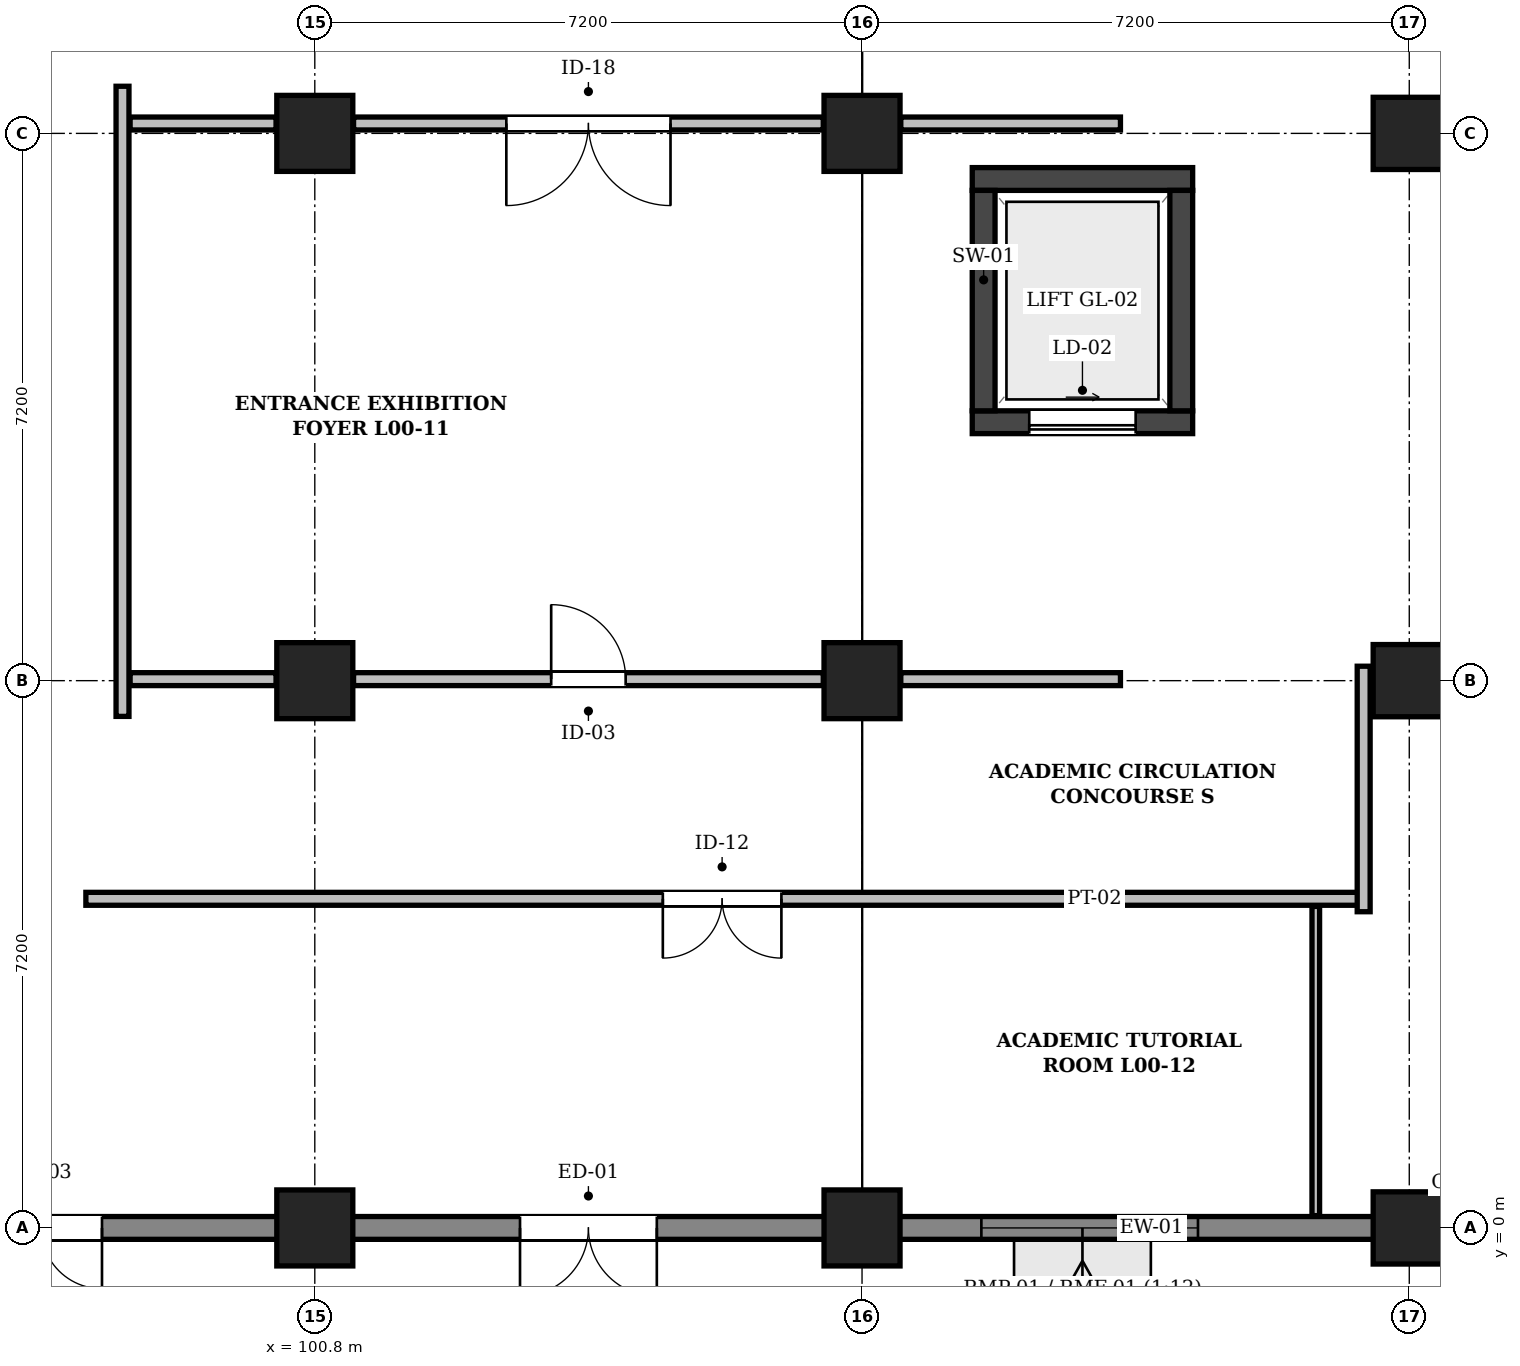
"""IFC4 building model, lengths in metres.
Left out: names, types, materials, properties, quantities, classifications, styles, units other than length and angle.
Written with IfcOpenShell. Run it as: python <this file> out.ifc"""

import sys

from ifc_helpers import new_model, si_unit, direction, frame, frame_2d, origin, origin_2d, place, context, subcontext, project, spatial, rectangle, extrude, element, fill, save


model = new_model("IFC4")
c1 = context("Model", 3, precision=1e-05, world=origin(), true_north=direction((0.0, 1.0)))
c2 = subcontext(c1, "Body", "Model", "MODEL_VIEW")
j1 = project(units=[si_unit("LENGTHUNIT", "METRE"), si_unit("PLANEANGLEUNIT", "RADIAN")], contexts=[c1])
p1 = place(None, origin())
s1 = spatial("IfcSite", under=j1, at=p1, CompositionType="ELEMENT")
p2 = place(p1, origin())
s2 = spatial("IfcBuilding", under=s1, at=p2, CompositionType="ELEMENT")
p3 = place(p2, origin())
s3 = spatial("IfcBuildingStorey", under=s2, at=p3, CompositionType="ELEMENT", Elevation=0.0)
for number, where, z_axis, x_axis in (
    (1, (100.8, 0.0, 0.0), (0.0, 0.0, 1.0), (1.0, 0.0, 0.0)),
    (2, (100.8, 7.2, 0.0), (0.0, 0.0, 1.0), (1.0, 0.0, 0.0)),
    (3, (100.8, 14.4, 0.0), (0.0, 0.0, 1.0), (1.0, 0.0, 0.0)),
    (4, (108.0, 0.0, 0.0), (0.0, 0.0, 1.0), (1.0, 0.0, 0.0)),
    (5, (108.0, 7.2, 0.0), (0.0, 0.0, 1.0), (1.0, 0.0, 0.0)),
    (6, (108.0, 14.4, 0.0), (0.0, 0.0, 1.0), (1.0, 0.0, 0.0)),
):
    element("IfcColumn", number, at=place(p3, frame(where, z_axis=z_axis, x_axis=x_axis)), inside=s3, PredefinedType="COLUMN", context=c2, shape_type="SweptSolid", body=[
        extrude(rectangle(XDim=1.0, YDim=1.0, at=origin_2d()), origin(), (0.0, 0.0, 1.0), 4.8),
    ])
for number, where, z_axis, x_axis in (
    (7, (115.2, 0.0, 0.0), (0.0, 0.0, 1.0), (1.0, 0.0, 0.0)),
    (8, (115.2, 7.2, 0.0), (0.0, 0.0, 1.0), (1.0, 0.0, 0.0)),
    (9, (115.2, 14.4, 0.0), (0.0, 0.0, 1.0), (1.0, 0.0, 0.0)),
):
    element("IfcColumn", number, at=place(p3, frame(where, z_axis=z_axis, x_axis=x_axis)), inside=s3, PredefinedType="COLUMN", context=c2, shape_type="SweptSolid", body=[
        extrude(rectangle(XDim=0.95, YDim=0.95, at=origin_2d()), origin(), (0.0, 0.0, 1.0), 4.8),
    ])
p4 = place(p3, frame((122.4, 0.0, 0.0), z_axis=(0.0, 0.0, 1.0), x_axis=(-1.0, 0.0, 0.0)))
e10 = element("IfcWall", 10, at=p4, inside=s3, PredefinedType="SOLIDWALL", context=c2, shape_type="SweptSolid", body=[
    extrude(rectangle(XDim=7.2, YDim=0.3, at=frame_2d((3.6, 0.0))), origin(), (0.0, 0.0, 1.0), 4.52),
])
p5 = place(p4, frame((3.12, 0.0, 0.0)))
e11 = element("IfcOpeningElement", 11, at=p5, cuts=e10, PredefinedType="OPENING", context=c2, shape_type="SweptSolid", body=[
    extrude(rectangle(XDim=0.96, YDim=2.1, at=frame_2d((0.48, 1.05))), frame((0.0, 0.162, 0.0), z_axis=(0.0, -1.0, 0.0), x_axis=(1.0, 0.0, 0.0)), (0.0, 0.0, 1.0), 0.324),
])
p6 = place(p3, frame((115.2, 0.0, 0.0), z_axis=(0.0, 0.0, 1.0), x_axis=(-1.0, 0.0, 0.0)))
e12 = element("IfcWall", 12, at=p6, inside=s3, PredefinedType="SOLIDWALL", context=c2, shape_type="SweptSolid", body=[
    extrude(rectangle(XDim=7.2, YDim=0.3, at=frame_2d((3.6, 0.0))), origin(), (0.0, 0.0, 1.0), 4.52),
])
p7 = place(p6, frame((2.78, 0.0, 0.95)))
e13 = element("IfcOpeningElement", 13, at=p7, cuts=e12, PredefinedType="OPENING", context=c2, shape_type="SweptSolid", body=[
    extrude(rectangle(XDim=2.85, YDim=1.55, at=frame_2d((1.425, 0.775))), frame((0.0, 0.162, 0.0), z_axis=(0.0, -1.0, 0.0), x_axis=(1.0, 0.0, 0.0)), (0.0, 0.0, 1.0), 0.324),
])
p8 = place(p3, frame((108.0, 0.0, 0.0), z_axis=(0.0, 0.0, 1.0), x_axis=(-1.0, 0.0, 0.0)))
e14 = element("IfcWall", 14, at=p8, inside=s3, PredefinedType="SOLIDWALL", context=c2, shape_type="SweptSolid", body=[
    extrude(rectangle(XDim=7.2, YDim=0.3, at=frame_2d((3.6, 0.0))), origin(), (0.0, 0.0, 1.0), 4.52),
])
p9 = place(p8, frame((2.7, 0.0, 0.0)))
e15 = element("IfcOpeningElement", 15, at=p9, cuts=e14, PredefinedType="OPENING", context=c2, shape_type="SweptSolid", body=[
    extrude(rectangle(XDim=1.8, YDim=2.2, at=frame_2d((0.9, 1.1))), frame((0.0, 0.162, 0.0), z_axis=(0.0, -1.0, 0.0), x_axis=(1.0, 0.0, 0.0)), (0.0, 0.0, 1.0), 0.324),
])
p10 = place(p3, frame((100.8, 0.0, 0.0), z_axis=(0.0, 0.0, 1.0), x_axis=(-1.0, 0.0, 0.0)))
e16 = element("IfcWall", 16, at=p10, inside=s3, PredefinedType="SOLIDWALL", context=c2, shape_type="SweptSolid", body=[
    extrude(rectangle(XDim=7.2, YDim=0.3, at=frame_2d((3.6, 0.0))), origin(), (0.0, 0.0, 1.0), 4.52),
])
p11 = place(p10, frame((2.8, 0.0, 0.0)))
e17 = element("IfcOpeningElement", 17, at=p11, cuts=e16, PredefinedType="OPENING", context=c2, shape_type="SweptSolid", body=[
    extrude(rectangle(XDim=1.6, YDim=2.2, at=frame_2d((0.8, 1.1))), frame((0.0, 0.162, 0.0), z_axis=(0.0, -1.0, 0.0), x_axis=(1.0, 0.0, 0.0)), (0.0, 0.0, 1.0), 0.324),
])
p12 = place(p3, frame((109.45, 10.6, 0.0), z_axis=(0.0, 0.0, 1.0), x_axis=(1.0, 0.0, 0.0)))
e18 = element("IfcWall", 18, at=p12, inside=s3, PredefinedType="SHEAR", context=c2, shape_type="SweptSolid", body=[
    extrude(rectangle(XDim=2.9, YDim=0.3, at=frame_2d((1.45, 0.0))), origin(), (0.0, 0.0, 1.0), 4.55),
])
p13 = place(p12, frame((0.75, 0.0, 0.0)))
e19 = element("IfcOpeningElement", 19, at=p13, cuts=e18, PredefinedType="OPENING", context=c2, shape_type="SweptSolid", body=[
    extrude(rectangle(XDim=1.4, YDim=2.2, at=frame_2d((0.7, 1.1))), frame((0.0, 0.162, 0.0), z_axis=(0.0, -1.0, 0.0), x_axis=(1.0, 0.0, 0.0)), (0.0, 0.0, 1.0), 0.324),
])
p14 = place(p3, frame((109.45, 13.8, 0.0), z_axis=(0.0, 0.0, 1.0), x_axis=(1.0, 0.0, 0.0)))
e20 = element("IfcWall", 20, at=p14, inside=s3, PredefinedType="SHEAR", context=c2, shape_type="SweptSolid", body=[
    extrude(rectangle(XDim=2.9, YDim=0.3, at=frame_2d((1.45, 0.0))), origin(), (0.0, 0.0, 1.0), 4.55),
])
for number, where, z_axis, x_axis in (
    (21, (109.6, 10.75, 0.0), (0.0, 0.0, 1.0), (0.0, 1.0, 0.0)),
    (22, (112.2, 10.75, 0.0), (0.0, 0.0, 1.0), (0.0, 1.0, 0.0)),
):
    element("IfcWall", number, at=place(p3, frame(where, z_axis=z_axis, x_axis=x_axis)), inside=s3, PredefinedType="SHEAR", context=c2, shape_type="SweptSolid", body=[
        extrude(rectangle(XDim=2.9, YDim=0.3, at=frame_2d((1.45, 0.0))), origin(), (0.0, 0.0, 1.0), 4.55),
    ])
p15 = place(p3, frame((98.27, 6.73, 0.0), z_axis=(0.0, 0.0, 1.0), x_axis=(0.0, 1.0, 0.0)))
e23 = element("IfcWall", 23, at=p15, inside=s3, PredefinedType="PARTITIONING", context=c2, shape_type="SweptSolid", body=[
    extrude(rectangle(XDim=8.29, YDim=0.17, at=frame_2d((4.145, 0.0))), origin(), (0.0, 0.0, 1.0), 4.46),
])
p16 = place(p3, frame((101.31, 14.53, 0.0), z_axis=(0.0, 0.0, 1.0), x_axis=(1.0, 0.0, 0.0)))
e24 = element("IfcWall", 24, at=p16, inside=s3, PredefinedType="PARTITIONING", context=c2, shape_type="SweptSolid", body=[
    extrude(rectangle(XDim=6.18, YDim=0.17, at=frame_2d((3.09, 0.0))), origin(), (0.0, 0.0, 1.0), 3.83),
])
p17 = place(p16, frame((2.01, 0.0, 0.0)))
e25 = element("IfcOpeningElement", 25, at=p17, cuts=e24, PredefinedType="OPENING", context=c2, shape_type="SweptSolid", body=[
    extrude(rectangle(XDim=2.16, YDim=2.35, at=frame_2d((1.08, 1.175))), frame((0.0, 0.097, 0.0), z_axis=(0.0, -1.0, 0.0), x_axis=(1.0, 0.0, 0.0)), (0.0, 0.0, 1.0), 0.194),
])
p18 = place(p3, frame((108.51, 14.53, 0.0), z_axis=(0.0, 0.0, 1.0), x_axis=(1.0, 0.0, 0.0)))
e26 = element("IfcWall", 26, at=p18, inside=s3, PredefinedType="PARTITIONING", context=c2, shape_type="SweptSolid", body=[
    extrude(rectangle(XDim=2.89, YDim=0.17, at=frame_2d((1.445, 0.0))), origin(), (0.0, 0.0, 1.0), 3.83),
])
p19 = place(p3, frame((98.37, 14.53, 0.0), z_axis=(0.0, 0.0, 1.0), x_axis=(1.0, 0.0, 0.0)))
e27 = element("IfcWall", 27, at=p19, inside=s3, PredefinedType="PARTITIONING", context=c2, shape_type="SweptSolid", body=[
    extrude(rectangle(XDim=1.92, YDim=0.17, at=frame_2d((0.96, 0.0))), origin(), (0.0, 0.0, 1.0), 3.83),
])
p20 = place(p3, frame((101.31, 7.22, 0.0), z_axis=(0.0, 0.0, 1.0), x_axis=(1.0, 0.0, 0.0)))
e28 = element("IfcWall", 28, at=p20, inside=s3, PredefinedType="PARTITIONING", context=c2, shape_type="SweptSolid", body=[
    extrude(rectangle(XDim=6.18, YDim=0.17, at=frame_2d((3.09, 0.0))), origin(), (0.0, 0.0, 1.0), 3.83),
])
p21 = place(p20, frame((2.6, 0.0, 0.0)))
e29 = element("IfcOpeningElement", 29, at=p21, cuts=e28, PredefinedType="OPENING", context=c2, shape_type="SweptSolid", body=[
    extrude(rectangle(XDim=0.98, YDim=2.14, at=frame_2d((0.49, 1.07))), frame((0.0, 0.097, 0.0), z_axis=(0.0, -1.0, 0.0), x_axis=(1.0, 0.0, 0.0)), (0.0, 0.0, 1.0), 0.194),
])
p22 = place(p3, frame((108.51, 7.22, 0.0), z_axis=(0.0, 0.0, 1.0), x_axis=(1.0, 0.0, 0.0)))
e30 = element("IfcWall", 30, at=p22, inside=s3, PredefinedType="PARTITIONING", context=c2, shape_type="SweptSolid", body=[
    extrude(rectangle(XDim=2.89, YDim=0.17, at=frame_2d((1.445, 0.0))), origin(), (0.0, 0.0, 1.0), 3.83),
])
p23 = place(p3, frame((98.37, 7.22, 0.0), z_axis=(0.0, 0.0, 1.0), x_axis=(1.0, 0.0, 0.0)))
e31 = element("IfcWall", 31, at=p23, inside=s3, PredefinedType="PARTITIONING", context=c2, shape_type="SweptSolid", body=[
    extrude(rectangle(XDim=1.92, YDim=0.17, at=frame_2d((0.96, 0.0))), origin(), (0.0, 0.0, 1.0), 3.83),
])
p24 = place(p3, frame((97.788, 4.33, 0.0), z_axis=(0.0, 0.0, 1.0), x_axis=(1.0, 0.0, 0.0)))
e32 = element("IfcWall", 32, at=p24, inside=s3, PredefinedType="PARTITIONING", context=c2, shape_type="SweptSolid", body=[
    extrude(rectangle(XDim=16.742, YDim=0.17, at=frame_2d((8.371, 0.0))), origin(), (0.0, 0.0, 1.0), 4.46),
])
p25 = place(p24, frame((7.591, 0.0, 0.0)))
e33 = element("IfcOpeningElement", 33, at=p25, cuts=e32, PredefinedType="OPENING", context=c2, shape_type="SweptSolid", body=[
    extrude(rectangle(XDim=1.56, YDim=2.26, at=frame_2d((0.78, 1.13))), frame((0.0, 0.097, 0.0), z_axis=(0.0, -1.0, 0.0), x_axis=(1.0, 0.0, 0.0)), (0.0, 0.0, 1.0), 0.194),
])
p26 = place(p3, frame((114.6, 4.16, 0.0), z_axis=(0.0, 0.0, 1.0), x_axis=(0.0, 1.0, 0.0)))
e34 = element("IfcWall", 34, at=p26, inside=s3, PredefinedType="PARTITIONING", context=c2, shape_type="SweptSolid", body=[
    extrude(rectangle(XDim=3.23, YDim=0.17, at=frame_2d((1.615, 0.0))), origin(), (0.0, 0.0, 1.0), 4.46),
])
p27 = place(p3, frame((113.97, 0.162, 0.0), z_axis=(0.0, 0.0, 1.0), x_axis=(0.0, 1.0, 0.0)))
e35 = element("IfcWall", 35, at=p27, inside=s3, PredefinedType="PARTITIONING", context=c2, shape_type="SweptSolid", body=[
    extrude(rectangle(XDim=4.068, YDim=0.1, at=frame_2d((2.034, 0.0))), origin(), (0.0, 0.0, 1.0), 4.46),
])
p28 = place(p7, origin())
e36 = element("IfcWindow", 36, at=p28, inside=s3, PartitioningType="SINGLE_PANEL", PredefinedType="WINDOW", context=c2, shape_type="SweptSolid", body=[
    extrude(rectangle(XDim=2.85, YDim=1.55, at=frame_2d((1.425, 0.775))), frame((0.0, 0.03, 0.0), z_axis=(0.0, -1.0, 0.0), x_axis=(1.0, 0.0, 0.0)), (0.0, 0.0, 1.0), 0.06),
])
fill(e13, e36)
p29 = place(p9, origin())
e37 = element("IfcDoor", 37, at=p29, inside=s3, OperationType="DOUBLE_DOOR_SINGLE_SWING", PredefinedType="DOOR", context=c2, shape_type="SweptSolid", body=[
    extrude(rectangle(XDim=1.8, YDim=2.2, at=frame_2d((0.9, 1.1))), frame((0.0, 0.025, 0.0), z_axis=(0.0, -1.0, 0.0), x_axis=(1.0, 0.0, 0.0)), (0.0, 0.0, 1.0), 0.05),
])
fill(e15, e37)
p30 = place(p11, origin())
e38 = element("IfcDoor", 38, at=p30, inside=s3, OperationType="DOUBLE_DOOR_SINGLE_SWING", PredefinedType="DOOR", context=c2, shape_type="SweptSolid", body=[
    extrude(rectangle(XDim=1.6, YDim=2.2, at=frame_2d((0.8, 1.1))), frame((0.0, 0.025, 0.0), z_axis=(0.0, -1.0, 0.0), x_axis=(1.0, 0.0, 0.0)), (0.0, 0.0, 1.0), 0.05),
])
fill(e17, e38)
p31 = place(p13, frame((1.4, 0.0, 0.0), z_axis=(0.0, 0.0, 1.0), x_axis=(-1.0, 0.0, 0.0)))
e39 = element("IfcDoor", 39, at=p31, inside=s3, OperationType="SLIDING_TO_RIGHT", PredefinedType="DOOR", context=c2, shape_type="SweptSolid", body=[
    extrude(rectangle(XDim=1.4, YDim=2.2, at=frame_2d((0.7, 1.1))), frame((0.0, 0.025, 0.0), z_axis=(0.0, -1.0, 0.0), x_axis=(1.0, 0.0, 0.0)), (0.0, 0.0, 1.0), 0.05),
])
fill(e19, e39)
p32 = place(p17, frame((2.16, 0.0, 0.0), z_axis=(0.0, 0.0, 1.0), x_axis=(-1.0, 0.0, 0.0)))
e40 = element("IfcDoor", 40, at=p32, inside=s3, OperationType="DOUBLE_DOOR_SINGLE_SWING", PredefinedType="DOOR", context=c2, shape_type="SweptSolid", body=[
    extrude(rectangle(XDim=2.16, YDim=2.35, at=frame_2d((1.08, 1.175))), frame((0.0, 0.025, 0.0), z_axis=(0.0, -1.0, 0.0), x_axis=(1.0, 0.0, 0.0)), (0.0, 0.0, 1.0), 0.05),
])
fill(e25, e40)
p33 = place(p21, origin())
e41 = element("IfcDoor", 41, at=p33, inside=s3, OperationType="SINGLE_SWING_LEFT", PredefinedType="DOOR", context=c2, shape_type="SweptSolid", body=[
    extrude(rectangle(XDim=0.98, YDim=2.14, at=frame_2d((0.49, 1.07))), frame((0.0, 0.025, 0.0), z_axis=(0.0, -1.0, 0.0), x_axis=(1.0, 0.0, 0.0)), (0.0, 0.0, 1.0), 0.05),
])
fill(e29, e41)
p34 = place(p25, frame((1.56, 0.0, 0.0), z_axis=(0.0, 0.0, 1.0), x_axis=(-1.0, 0.0, 0.0)))
e42 = element("IfcDoor", 42, at=p34, inside=s3, OperationType="DOUBLE_DOOR_SINGLE_SWING", PredefinedType="DOOR", context=c2, shape_type="SweptSolid", body=[
    extrude(rectangle(XDim=1.56, YDim=2.26, at=frame_2d((0.78, 1.13))), frame((0.0, 0.025, 0.0), z_axis=(0.0, -1.0, 0.0), x_axis=(1.0, 0.0, 0.0)), (0.0, 0.0, 1.0), 0.05),
])
fill(e33, e42)
save(model, sys.argv[1])
